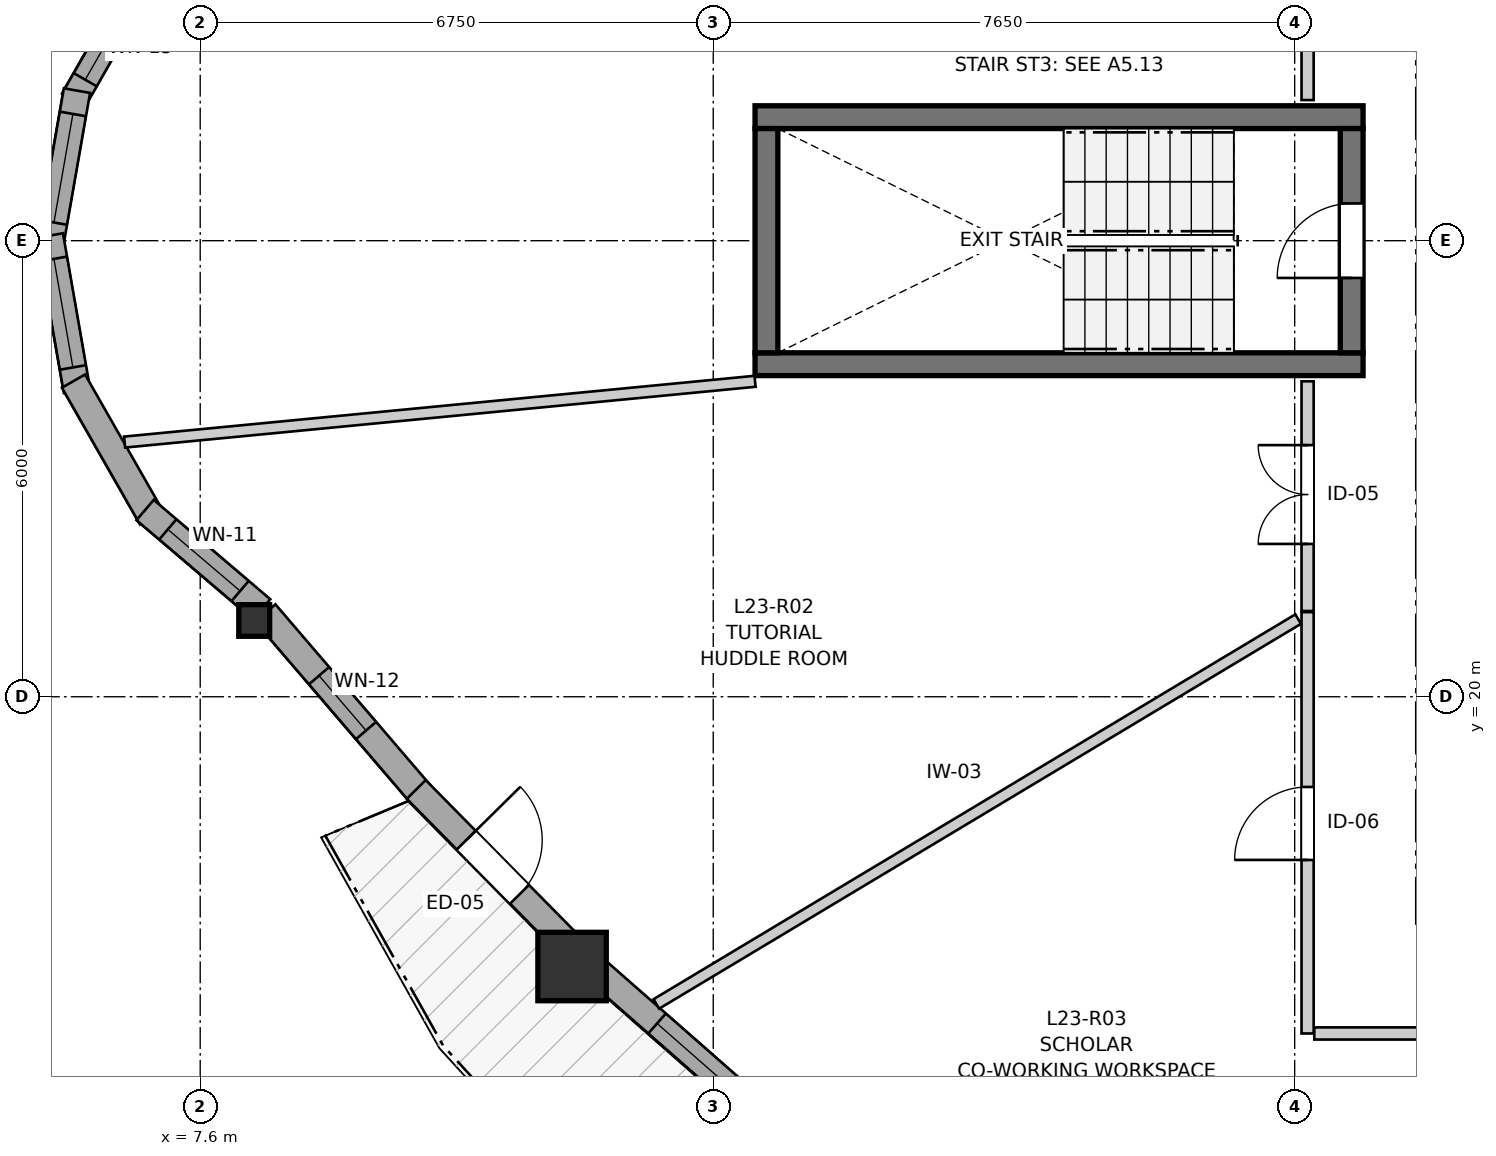
"""IFC4 building model, lengths in metres.
Left out: names, types, materials, properties, quantities, classifications, styles, units other than length and angle.
Written with IfcOpenShell. Run it as: python <this file> out.ifc"""

import sys

from ifc_helpers import new_model, si_unit, direction, frame, frame_2d, origin, origin_2d, place, context, subcontext, project, spatial, rectangle, i_section, extrude, source, transform, mapped, element, fill, save


model = new_model("IFC4")
c1 = context("Model", 3, precision=1e-05, world=origin(), true_north=direction((0.0, 1.0)))
c2 = subcontext(c1, "Body", "Model", "MODEL_VIEW")
j1 = project(units=[si_unit("LENGTHUNIT", "METRE"), si_unit("PLANEANGLEUNIT", "RADIAN")], contexts=[c1])
p1 = place(None, origin())
s1 = spatial("IfcSite", under=j1, at=p1, CompositionType="ELEMENT")
p2 = place(p1, origin())
s2 = spatial("IfcBuilding", under=s1, at=p2, CompositionType="ELEMENT")
p3 = place(p2, frame((0.0, 0.0, 80.0)))
s3 = spatial("IfcBuildingStorey", under=s2, at=p3, CompositionType="ELEMENT", Elevation=80.0)
for number, where, z_axis, x_axis in (
    (1, (14.9, 24.375, 0.0), (0.0, 0.0, 1.0), (1.0, 0.0, 0.0)),
    (2, (22.9, 27.625, 0.0), (0.0, 0.0, 1.0), (-1.0, 0.0, 0.0)),
):
    element("IfcWall", number, at=place(p3, frame(where, z_axis=z_axis, x_axis=x_axis)), inside=s3, PredefinedType="SHEAR", context=c2, shape_type="SweptSolid", body=[
        extrude(rectangle(XDim=8.0, YDim=0.3, at=frame_2d((4.0, 0.0))), origin(), (0.0, 0.0, 1.0), 2.935),
    ])
p4 = place(p3, frame((15.05, 27.475, 0.0), z_axis=(0.0, 0.0, 1.0), x_axis=(0.0, -1.0, 0.0)))
e3 = element("IfcWall", 3, at=p4, inside=s3, PredefinedType="SHEAR", context=c2, shape_type="SweptSolid", body=[
    extrude(rectangle(XDim=2.95, YDim=0.3, at=frame_2d((1.475, 0.0))), origin(), (0.0, 0.0, 1.0), 2.935),
])
p5 = place(p3, frame((22.75, 24.525, 0.0), z_axis=(0.0, 0.0, 1.0), x_axis=(0.0, 1.0, 0.0)))
e4 = element("IfcWall", 4, at=p5, inside=s3, PredefinedType="SHEAR", context=c2, shape_type="SweptSolid", body=[
    extrude(rectangle(XDim=2.95, YDim=0.3, at=frame_2d((1.475, 0.0))), origin(), (0.0, 0.0, 1.0), 2.935),
])
p6 = place(p5, frame((0.985, 0.0, 0.0)))
e5 = element("IfcOpeningElement", 5, at=p6, cuts=e4, PredefinedType="OPENING", context=c2, shape_type="SweptSolid", body=[
    extrude(rectangle(XDim=0.98, YDim=2.15, at=frame_2d((0.49, 1.075))), frame((0.0, 0.16, 0.0), z_axis=(0.0, -1.0, 0.0), x_axis=(1.0, 0.0, 0.0)), (0.0, 0.0, 1.0), 0.32),
])
m1 = source(origin(), c2, "Body", "SweptSolid", [
    extrude(i_section(OverallWidth=0.406, OverallDepth=0.416, WebThickness=0.027, FlangeThickness=0.044, FilletRadius=0.015, at=origin_2d()), origin(), (0.0, 0.0, 1.0), 2.935),
])
p7 = place(p3, frame((8.31, 21.004, 0.0), z_axis=(0.0, 0.0, 1.0), x_axis=(1.0, 0.0, 0.0)))
e6 = element("IfcColumn", 6, at=p7, inside=s3, PredefinedType="PILASTER", context=c2, shape_type="MappedRepresentation", body=[
    mapped(m1, transform((0.0, 0.0, 0.0), x_axis=(1.0, 0.0, 0.0), y_axis=(0.0, 1.0, 0.0), z_axis=(0.0, 0.0, 1.0), scale=1.0)),
])
m2 = source(origin(), c2, "Body", "SweptSolid", [
    extrude(rectangle(XDim=0.9, YDim=0.9, at=origin_2d()), origin(), (0.0, 0.0, 1.0), 2.935),
])
p8 = place(p3, frame((12.493, 16.451, 0.0), z_axis=(0.0, 0.0, 1.0), x_axis=(1.0, 0.0, 0.0)))
e7 = element("IfcColumn", 7, at=p8, inside=s3, PredefinedType="COLUMN", context=c2, shape_type="MappedRepresentation", body=[
    mapped(m2, transform((0.0, 0.0, 0.0), x_axis=(1.0, 0.0, 0.0), y_axis=(0.0, 1.0, 0.0), z_axis=(0.0, 0.0, 1.0), scale=1.0)),
])
p9 = place(p3, frame((6.961, 29.647, 0.0), z_axis=(0.0, 0.0, 1.0), x_axis=(-0.496037473582, -0.868301114132, 0.0)))
e8 = element("IfcWall", 8, at=p9, inside=s3, PredefinedType="SOLIDWALL", context=c2, shape_type="SweptSolid", body=[
    extrude(rectangle(XDim=2.073, YDim=0.35, at=frame_2d((1.037, 0.0))), origin(), (0.0, 0.0, 1.0), 2.465),
])
p10 = place(p9, frame((0.312, 0.0, 0.82)))
e9 = element("IfcOpeningElement", 9, at=p10, cuts=e8, PredefinedType="OPENING", context=c2, shape_type="SweptSolid", body=[
    extrude(rectangle(XDim=1.45, YDim=1.25, at=frame_2d((0.725, 0.625))), frame((0.0, 0.185, 0.0), z_axis=(0.0, -1.0, 0.0), x_axis=(1.0, 0.0, 0.0)), (0.0, 0.0, 1.0), 0.37),
])
p11 = place(p3, frame((5.979, 27.975, 0.0), z_axis=(0.0, 0.0, 1.0), x_axis=(-0.172166087538, -0.985067935881, 0.0)))
e10 = element("IfcWall", 10, at=p11, inside=s3, PredefinedType="SOLIDWALL", context=c2, shape_type="SweptSolid", body=[
    extrude(rectangle(XDim=2.073, YDim=0.35, at=frame_2d((1.037, 0.0))), origin(), (0.0, 0.0, 1.0), 2.465),
])
p12 = place(p11, frame((0.312, 0.0, 0.82)))
e11 = element("IfcOpeningElement", 11, at=p12, cuts=e10, PredefinedType="OPENING", context=c2, shape_type="SweptSolid", body=[
    extrude(rectangle(XDim=1.45, YDim=1.25, at=frame_2d((0.725, 0.625))), frame((0.0, 0.185, 0.0), z_axis=(0.0, -1.0, 0.0), x_axis=(1.0, 0.0, 0.0)), (0.0, 0.0, 1.0), 0.37),
])
p13 = place(p3, frame((5.622, 26.068, 0.0), z_axis=(0.0, 0.0, 1.0), x_axis=(0.172166087538, -0.985067935881, 0.0)))
e12 = element("IfcWall", 12, at=p13, inside=s3, PredefinedType="SOLIDWALL", context=c2, shape_type="SweptSolid", body=[
    extrude(rectangle(XDim=2.073, YDim=0.35, at=frame_2d((1.037, 0.0))), origin(), (0.0, 0.0, 1.0), 2.465),
])
p14 = place(p13, frame((0.312, 0.0, 0.82)))
e13 = element("IfcOpeningElement", 13, at=p14, cuts=e12, PredefinedType="OPENING", context=c2, shape_type="SweptSolid", body=[
    extrude(rectangle(XDim=1.45, YDim=1.25, at=frame_2d((0.725, 0.625))), frame((0.0, 0.185, 0.0), z_axis=(0.0, -1.0, 0.0), x_axis=(1.0, 0.0, 0.0)), (0.0, 0.0, 1.0), 0.37),
])
p15 = place(p3, frame((5.933, 24.153, 0.0), z_axis=(0.0, 0.0, 1.0), x_axis=(0.496037473582, -0.868301114132, 0.0)))
e14 = element("IfcWall", 14, at=p15, inside=s3, PredefinedType="SOLIDWALL", context=c2, shape_type="SweptSolid", body=[
    extrude(rectangle(XDim=2.073, YDim=0.35, at=frame_2d((1.037, 0.0))), origin(), (0.0, 0.0, 1.0), 2.465),
])
p16 = place(p3, frame((6.875, 22.457, 0.0), z_axis=(0.0, 0.0, 1.0), x_axis=(0.761203352049, -0.648513266502, 0.0)))
e15 = element("IfcWall", 15, at=p16, inside=s3, PredefinedType="SOLIDWALL", context=c2, shape_type="SweptSolid", body=[
    extrude(rectangle(XDim=2.015, YDim=0.35, at=frame_2d((1.007, 0.0))), origin(), (0.0, 0.0, 1.0), 2.465),
])
p17 = place(p16, frame((0.393, 0.0, 0.82)))
e16 = element("IfcOpeningElement", 16, at=p17, cuts=e15, PredefinedType="OPENING", context=c2, shape_type="SweptSolid", body=[
    extrude(rectangle(XDim=1.25, YDim=1.35, at=frame_2d((0.625, 0.675))), frame((0.0, 0.185, 0.0), z_axis=(0.0, -1.0, 0.0), x_axis=(1.0, 0.0, 0.0)), (0.0, 0.0, 1.0), 0.37),
])
p18 = place(p3, frame((8.456, 21.102, 0.0), z_axis=(0.0, 0.0, 1.0), x_axis=(0.650733809993, -0.759305938692, 0.0)))
e17 = element("IfcWall", 17, at=p18, inside=s3, PredefinedType="SOLIDWALL", context=c2, shape_type="SweptSolid", body=[
    extrude(rectangle(XDim=3.144, YDim=0.35, at=frame_2d((1.572, 0.0))), origin(), (0.0, 0.0, 1.0), 2.465),
])
p19 = place(p18, frame((1.087, 0.0, 0.82)))
e18 = element("IfcOpeningElement", 18, at=p19, cuts=e17, PredefinedType="OPENING", context=c2, shape_type="SweptSolid", body=[
    extrude(rectangle(XDim=0.95, YDim=1.35, at=frame_2d((0.475, 0.675))), frame((0.0, 0.185, 0.0), z_axis=(0.0, -1.0, 0.0), x_axis=(1.0, 0.0, 0.0)), (0.0, 0.0, 1.0), 0.37),
])
p20 = place(p3, frame((10.442, 18.78, 0.0), z_axis=(0.0, 0.0, 1.0), x_axis=(0.7019473345, -0.712228853381, 0.0)))
e19 = element("IfcWall", 19, at=p20, inside=s3, PredefinedType="SOLIDWALL", context=c2, shape_type="SweptSolid", body=[
    extrude(rectangle(XDim=2.873, YDim=0.35, at=frame_2d((1.437, 0.0))), origin(), (0.0, 0.0, 1.0), 2.465),
])
p21 = place(p20, frame((0.937, 0.0, 0.0)))
e20 = element("IfcOpeningElement", 20, at=p21, cuts=e19, PredefinedType="OPENING", context=c2, shape_type="SweptSolid", body=[
    extrude(rectangle(XDim=1.0, YDim=2.1, at=frame_2d((0.5, 1.05))), frame((0.0, 0.185, 0.0), z_axis=(0.0, -1.0, 0.0), x_axis=(1.0, 0.0, 0.0)), (0.0, 0.0, 1.0), 0.37),
])
p22 = place(p3, frame((12.777, 16.434, 0.0), z_axis=(0.0, 0.0, 1.0), x_axis=(0.751531192513, -0.659697556976, 0.0)))
e21 = element("IfcWall", 21, at=p22, inside=s3, PredefinedType="SOLIDWALL", context=c2, shape_type="SweptSolid", body=[
    extrude(rectangle(XDim=2.823, YDim=0.35, at=frame_2d((1.412, 0.0))), origin(), (0.0, 0.0, 1.0), 2.465),
])
p23 = place(p22, frame((1.11, 0.0, 0.82)))
e22 = element("IfcOpeningElement", 22, at=p23, cuts=e21, PredefinedType="OPENING", context=c2, shape_type="SweptSolid", body=[
    extrude(rectangle(XDim=1.45, YDim=1.25, at=frame_2d((0.725, 0.625))), frame((0.0, 0.185, 0.0), z_axis=(0.0, -1.0, 0.0), x_axis=(1.0, 0.0, 0.0)), (0.0, 0.0, 1.0), 0.37),
])
p24 = place(p3, frame((22.17, 15.57, 0.0), z_axis=(0.0, 0.0, 1.0), x_axis=(0.0, 1.0, 0.0)))
e23 = element("IfcWall", 23, at=p24, inside=s3, PredefinedType="PARTITIONING", context=c2, shape_type="SweptSolid", body=[
    extrude(rectangle(XDim=5.543, YDim=0.16, at=frame_2d((2.771, 0.0))), origin(), (0.0, 0.0, 1.0), 2.935),
])
p25 = place(p24, frame((2.283, 0.0, 0.0)))
e24 = element("IfcOpeningElement", 24, at=p25, cuts=e23, PredefinedType="OPENING", context=c2, shape_type="SweptSolid", body=[
    extrude(rectangle(XDim=0.96, YDim=2.1, at=frame_2d((0.48, 1.05))), frame((0.0, 0.09, 0.0), z_axis=(0.0, -1.0, 0.0), x_axis=(1.0, 0.0, 0.0)), (0.0, 0.0, 1.0), 0.18),
])
p26 = place(p3, frame((22.17, 27.85, 0.0), z_axis=(0.0, 0.0, 1.0), x_axis=(0.0, 1.0, 0.0)))
e25 = element("IfcWall", 25, at=p26, inside=s3, PredefinedType="PARTITIONING", context=c2, shape_type="SweptSolid", body=[
    extrude(rectangle(XDim=5.276, YDim=0.16, at=frame_2d((2.638, 0.0))), origin(), (0.0, 0.0, 1.0), 2.935),
])
p27 = place(p26, frame((2.689, 0.0, 0.0)))
e26 = element("IfcOpeningElement", 26, at=p27, cuts=e25, PredefinedType="OPENING", context=c2, shape_type="SweptSolid", body=[
    extrude(rectangle(XDim=1.3, YDim=2.1, at=frame_2d((0.65, 1.05))), frame((0.0, 0.09, 0.0), z_axis=(0.0, -1.0, 0.0), x_axis=(1.0, 0.0, 0.0)), (0.0, 0.0, 1.0), 0.18),
])
p28 = place(p3, frame((22.17, 21.128, 0.0), z_axis=(0.0, 0.0, 1.0), x_axis=(0.0, 1.0, 0.0)))
e27 = element("IfcWall", 27, at=p28, inside=s3, PredefinedType="PARTITIONING", context=c2, shape_type="SweptSolid", body=[
    extrude(rectangle(XDim=3.022, YDim=0.16, at=frame_2d((1.511, 0.0))), origin(), (0.0, 0.0, 1.0), 2.935),
])
p29 = place(p28, frame((0.883, 0.0, 0.0)))
e28 = element("IfcOpeningElement", 28, at=p29, cuts=e27, PredefinedType="OPENING", context=c2, shape_type="SweptSolid", body=[
    extrude(rectangle(XDim=1.3, YDim=2.1, at=frame_2d((0.65, 1.05))), frame((0.0, 0.09, 0.0), z_axis=(0.0, -1.0, 0.0), x_axis=(1.0, 0.0, 0.0)), (0.0, 0.0, 1.0), 0.18),
])
p30 = place(p3, frame((13.601, 15.958, 0.0), z_axis=(0.0, 0.0, 1.0), x_axis=(0.857661345212, 0.514214952066, 0.0)))
e29 = element("IfcWall", 29, at=p30, inside=s3, PredefinedType="PARTITIONING", context=c2, shape_type="SweptSolid", body=[
    extrude(rectangle(XDim=9.846, YDim=0.145, at=frame_2d((4.923, 0.0))), origin(), (0.0, 0.0, 1.0), 2.935),
])
p31 = place(p3, frame((6.605, 23.351, 0.0), z_axis=(0.0, 0.0, 1.0), x_axis=(0.995388985265, 0.09592063393, 0.0)))
e30 = element("IfcWall", 30, at=p31, inside=s3, PredefinedType="PARTITIONING", context=c2, shape_type="SweptSolid", body=[
    extrude(rectangle(XDim=8.333, YDim=0.145, at=frame_2d((4.167, 0.0))), origin(), (0.0, 0.0, 1.0), 2.935),
])
p32 = place(p3, frame((23.186, 9.634, 0.0), z_axis=(0.0, 0.0, 1.0), x_axis=(0.400994208685, 0.916080588486, 0.0)))
e31 = element("IfcWall", 31, at=p32, inside=s3, PredefinedType="PARTITIONING", context=c2, shape_type="SweptSolid", body=[
    extrude(rectangle(XDim=6.353, YDim=0.145, at=frame_2d((3.177, 0.0))), origin(), (0.0, 0.0, 1.0), 2.935),
])
p33 = place(p3, frame((22.258, 15.57, 0.0), z_axis=(0.0, 0.0, 1.0), x_axis=(1.0, 0.0, 0.0)))
e32 = element("IfcWall", 32, at=p33, inside=s3, PredefinedType="PARTITIONING", context=c2, shape_type="SweptSolid", body=[
    extrude(rectangle(XDim=3.373, YDim=0.16, at=frame_2d((1.687, 0.0))), origin(), (0.0, 0.0, 1.0), 2.935),
])
m3 = source(origin(), c2, "Body", "SweptSolid", [
    extrude(rectangle(XDim=1.45, YDim=1.25, at=frame_2d((0.725, 0.625))), frame((0.0, 0.03, 0.0), z_axis=(0.0, -1.0, 0.0), x_axis=(1.0, 0.0, 0.0)), (0.0, 0.0, 1.0), 0.06),
])
p34 = place(p10, origin())
e33 = element("IfcWindow", 33, at=p34, inside=s3, PartitioningType="SINGLE_PANEL", PredefinedType="WINDOW", context=c2, shape_type="MappedRepresentation", body=[
    mapped(m3, transform((0.0, 0.0, 0.0), x_axis=(1.0, 0.0, 0.0), y_axis=(0.0, 1.0, 0.0), z_axis=(0.0, 0.0, 1.0), scale=1.0)),
])
fill(e9, e33)
p35 = place(p12, origin())
e34 = element("IfcWindow", 34, at=p35, inside=s3, PartitioningType="SINGLE_PANEL", PredefinedType="WINDOW", context=c2, shape_type="MappedRepresentation", body=[
    mapped(m3, transform((0.0, 0.0, 0.0), x_axis=(1.0, 0.0, 0.0), y_axis=(0.0, 1.0, 0.0), z_axis=(0.0, 0.0, 1.0), scale=1.0)),
])
fill(e11, e34)
p36 = place(p14, origin())
e35 = element("IfcWindow", 35, at=p36, inside=s3, PartitioningType="SINGLE_PANEL", PredefinedType="WINDOW", context=c2, shape_type="MappedRepresentation", body=[
    mapped(m3, transform((0.0, 0.0, 0.0), x_axis=(1.0, 0.0, 0.0), y_axis=(0.0, 1.0, 0.0), z_axis=(0.0, 0.0, 1.0), scale=1.0)),
])
fill(e13, e35)
m4 = source(origin(), c2, "Body", "SweptSolid", [
    extrude(rectangle(XDim=1.25, YDim=1.35, at=frame_2d((0.625, 0.675))), frame((0.0, 0.03, 0.0), z_axis=(0.0, -1.0, 0.0), x_axis=(1.0, 0.0, 0.0)), (0.0, 0.0, 1.0), 0.06),
])
p37 = place(p17, origin())
e36 = element("IfcWindow", 36, at=p37, inside=s3, PartitioningType="SINGLE_PANEL", PredefinedType="WINDOW", context=c2, shape_type="MappedRepresentation", body=[
    mapped(m4, transform((0.0, 0.0, 0.0), x_axis=(1.0, 0.0, 0.0), y_axis=(0.0, 1.0, 0.0), z_axis=(0.0, 0.0, 1.0), scale=1.0)),
])
fill(e16, e36)
m5 = source(origin(), c2, "Body", "SweptSolid", [
    extrude(rectangle(XDim=0.95, YDim=1.35, at=frame_2d((0.475, 0.675))), frame((0.0, 0.03, 0.0), z_axis=(0.0, -1.0, 0.0), x_axis=(1.0, 0.0, 0.0)), (0.0, 0.0, 1.0), 0.06),
])
p38 = place(p19, origin())
e37 = element("IfcWindow", 37, at=p38, inside=s3, PartitioningType="SINGLE_PANEL", PredefinedType="WINDOW", context=c2, shape_type="MappedRepresentation", body=[
    mapped(m5, transform((0.0, 0.0, 0.0), x_axis=(1.0, 0.0, 0.0), y_axis=(0.0, 1.0, 0.0), z_axis=(0.0, 0.0, 1.0), scale=1.0)),
])
fill(e18, e37)
p39 = place(p23, origin())
e38 = element("IfcWindow", 38, at=p39, inside=s3, PartitioningType="SINGLE_PANEL", PredefinedType="WINDOW", context=c2, shape_type="MappedRepresentation", body=[
    mapped(m3, transform((0.0, 0.0, 0.0), x_axis=(1.0, 0.0, 0.0), y_axis=(0.0, 1.0, 0.0), z_axis=(0.0, 0.0, 1.0), scale=1.0)),
])
fill(e22, e38)
m6 = source(origin(), c2, "Body", "SweptSolid", [
    extrude(rectangle(XDim=1.0, YDim=2.1, at=frame_2d((0.5, 1.05))), frame((0.0, 0.025, 0.0), z_axis=(0.0, -1.0, 0.0), x_axis=(1.0, 0.0, 0.0)), (0.0, 0.0, 1.0), 0.05),
])
p40 = place(p21, origin())
e39 = element("IfcDoor", 39, at=p40, inside=s3, OperationType="SINGLE_SWING_LEFT", PredefinedType="DOOR", context=c2, shape_type="MappedRepresentation", body=[
    mapped(m6, transform((0.0, 0.0, 0.0), x_axis=(1.0, 0.0, 0.0), y_axis=(0.0, 1.0, 0.0), z_axis=(0.0, 0.0, 1.0), scale=1.0)),
])
fill(e20, e39)
m7 = source(origin(), c2, "Body", "SweptSolid", [
    extrude(rectangle(XDim=0.98, YDim=2.15, at=frame_2d((0.49, 1.075))), frame((0.0, 0.025, 0.0), z_axis=(0.0, -1.0, 0.0), x_axis=(1.0, 0.0, 0.0)), (0.0, 0.0, 1.0), 0.05),
])
p41 = place(p6, origin())
e40 = element("IfcDoor", 40, at=p41, inside=s3, OperationType="SINGLE_SWING_LEFT", PredefinedType="DOOR", context=c2, shape_type="MappedRepresentation", body=[
    mapped(m7, transform((0.0, 0.0, 0.0), x_axis=(1.0, 0.0, 0.0), y_axis=(0.0, 1.0, 0.0), z_axis=(0.0, 0.0, 1.0), scale=1.0)),
])
fill(e5, e40)
m8 = source(origin(), c2, "Body", "SweptSolid", [
    extrude(rectangle(XDim=0.96, YDim=2.1, at=frame_2d((0.48, 1.05))), frame((0.0, 0.025, 0.0), z_axis=(0.0, -1.0, 0.0), x_axis=(1.0, 0.0, 0.0)), (0.0, 0.0, 1.0), 0.05),
])
p42 = place(p25, origin())
e41 = element("IfcDoor", 41, at=p42, inside=s3, OperationType="SINGLE_SWING_LEFT", PredefinedType="DOOR", context=c2, shape_type="MappedRepresentation", body=[
    mapped(m8, transform((0.0, 0.0, 0.0), x_axis=(1.0, 0.0, 0.0), y_axis=(0.0, 1.0, 0.0), z_axis=(0.0, 0.0, 1.0), scale=1.0)),
])
fill(e24, e41)
m9 = source(origin(), c2, "Body", "SweptSolid", [
    extrude(rectangle(XDim=1.3, YDim=2.1, at=frame_2d((0.65, 1.05))), frame((0.0, 0.025, 0.0), z_axis=(0.0, -1.0, 0.0), x_axis=(1.0, 0.0, 0.0)), (0.0, 0.0, 1.0), 0.05),
])
p43 = place(p29, origin())
e42 = element("IfcDoor", 42, at=p43, inside=s3, OperationType="DOUBLE_DOOR_SINGLE_SWING", PredefinedType="DOOR", context=c2, shape_type="MappedRepresentation", body=[
    mapped(m9, transform((0.0, 0.0, 0.0), x_axis=(1.0, 0.0, 0.0), y_axis=(0.0, 1.0, 0.0), z_axis=(0.0, 0.0, 1.0), scale=1.0)),
])
fill(e28, e42)
save(model, sys.argv[1])
